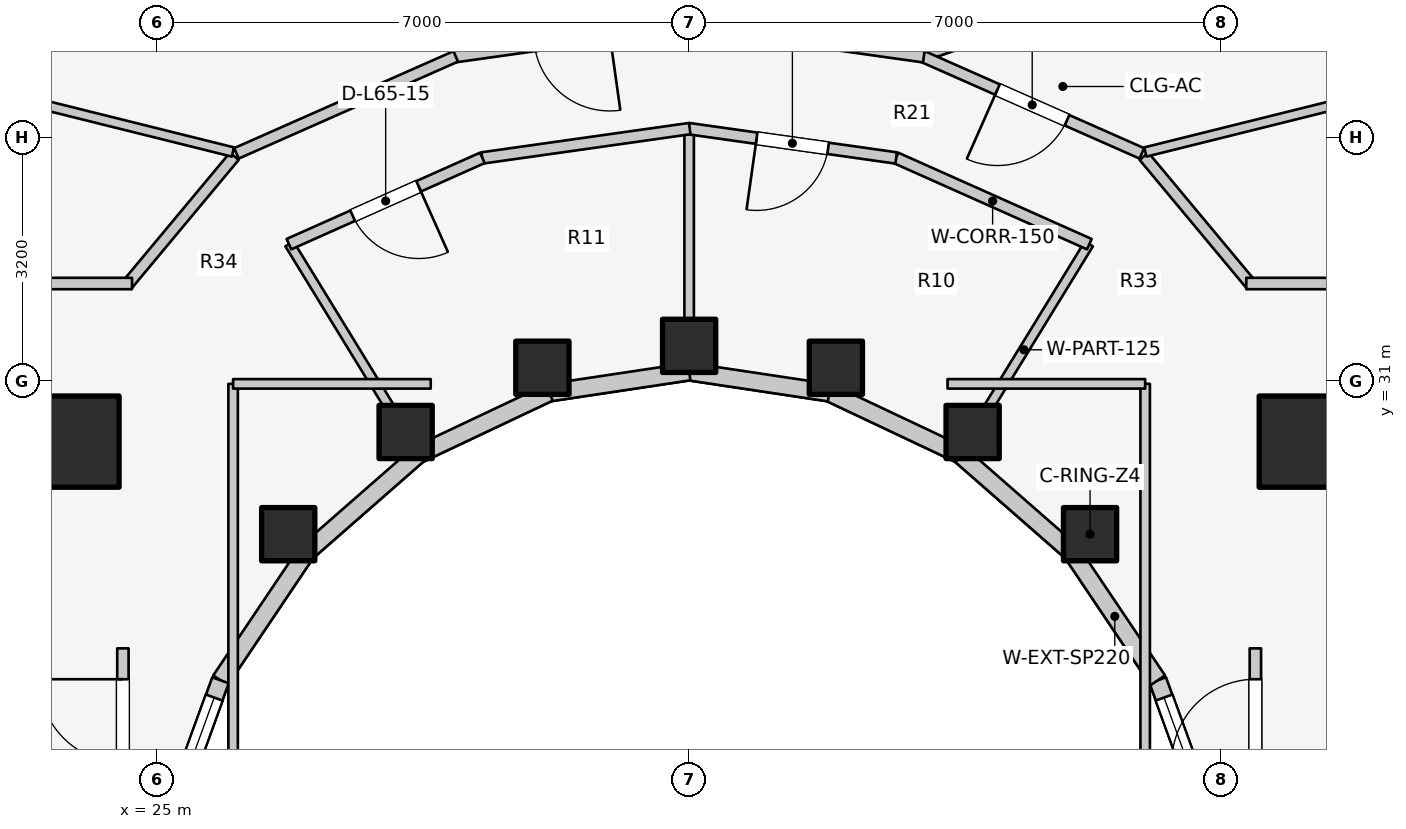
"""IFC4 building model, lengths in metres.
Left out: names, types, materials, properties, quantities, classifications, styles, units other than length and angle.
Written with IfcOpenShell. Run it as: python <this file> out.ifc"""

import sys

from ifc_helpers import new_model, si_unit, direction, frame, frame_2d, origin, origin_2d, place, context, subcontext, project, spatial, rectangle, extrude, element, fill, save


model = new_model("IFC4")
c1 = context("Model", 3, precision=1e-05, world=origin(), true_north=direction((0.0, 1.0)))
c2 = subcontext(c1, "Body", "Model", "MODEL_VIEW")
j1 = project(units=[si_unit("LENGTHUNIT", "METRE"), si_unit("PLANEANGLEUNIT", "RADIAN")], contexts=[c1])
p1 = place(None, origin())
s1 = spatial("IfcSite", under=j1, at=p1, CompositionType="ELEMENT")
p2 = place(p1, origin())
s2 = spatial("IfcBuilding", under=s1, at=p2, CompositionType="ELEMENT")
p3 = place(p2, frame((0.0, 0.0, 214.0)))
s3 = spatial("IfcBuildingStorey", under=s2, at=p3, CompositionType="ELEMENT", Elevation=214.0)
for number, where, z_axis, x_axis in (
    (1, (19.65, 30.35, 0.0), (0.0, 0.0, 1.0), (1.0, 0.0, 0.0)),
    (2, (39.85, 30.35, 0.0), (0.0, 0.0, 1.0), (1.0, 0.0, 0.0)),
):
    element("IfcWall", number, at=place(p3, frame(where, z_axis=z_axis, x_axis=x_axis)), inside=s3, PredefinedType="SHEAR", context=c2, shape_type="SweptSolid", body=[
        extrude(rectangle(XDim=4.5, YDim=0.55, at=frame_2d((2.25, 0.0))), origin(), (0.0, 0.0, 1.0), 3.1),
    ])
for number, where, z_axis, x_axis in (
    (3, (23.9, 30.2, 0.0), (0.0, 0.0, 1.0), (1.0, 0.0, 0.0)),
    (4, (40.1, 30.2, 0.0), (0.0, 0.0, 1.0), (1.0, 0.0, 0.0)),
):
    element("IfcColumn", number, at=place(p3, frame(where, z_axis=z_axis, x_axis=x_axis)), inside=s3, PredefinedType="COLUMN", context=c2, shape_type="SweptSolid", body=[
        extrude(rectangle(XDim=1.2, YDim=1.2, at=origin_2d()), origin(), (0.0, 0.0, 1.0), 3.1),
    ])
for number, where, z_axis, x_axis in (
    (5, (37.275, 28.982, 0.0), (0.0, 0.0, 1.0), (1.0, 0.0, 0.0)),
    (6, (35.73, 30.327, 0.0), (0.0, 0.0, 1.0), (1.0, 0.0, 0.0)),
    (7, (33.931, 31.172, 0.0), (0.0, 0.0, 1.0), (1.0, 0.0, 0.0)),
    (8, (32.0, 31.46, 0.0), (0.0, 0.0, 1.0), (1.0, 0.0, 0.0)),
    (9, (30.069, 31.172, 0.0), (0.0, 0.0, 1.0), (1.0, 0.0, 0.0)),
    (10, (28.27, 30.327, 0.0), (0.0, 0.0, 1.0), (1.0, 0.0, 0.0)),
    (11, (26.725, 28.982, 0.0), (0.0, 0.0, 1.0), (1.0, 0.0, 0.0)),
):
    element("IfcColumn", number, at=place(p3, frame(where, z_axis=z_axis, x_axis=x_axis)), inside=s3, PredefinedType="COLUMN", context=c2, shape_type="SweptSolid", body=[
        extrude(rectangle(XDim=0.7, YDim=0.7, at=origin_2d()), origin(), (0.0, 0.0, 1.0), 3.1),
    ])
p4 = place(p3, frame((38.877, 25.102, 0.0), z_axis=(0.0, 0.0, 1.0), x_axis=(-0.341423187295, 0.93990968033, 0.0)))
e12 = element("IfcWall", 12, at=p4, inside=s3, PredefinedType="STANDARD", context=c2, shape_type="SweptSolid", body=[
    extrude(rectangle(XDim=2.084, YDim=0.23, at=frame_2d((1.042, 0.0))), origin(), (0.0, 0.0, 1.0), 2.84),
])
p5 = place(p4, frame((0.242, 0.0, 0.85)))
e13 = element("IfcOpeningElement", 13, at=p5, cuts=e12, PredefinedType="OPENING", context=c2, shape_type="SweptSolid", body=[
    extrude(rectangle(XDim=1.6, YDim=1.65, at=frame_2d((0.8, 0.825))), frame((0.0, 0.125, 0.0), z_axis=(0.0, -1.0, 0.0), x_axis=(1.0, 0.0, 0.0)), (0.0, 0.0, 1.0), 0.25),
])
p6 = place(p3, frame((38.166, 27.06, 0.0), z_axis=(0.0, 0.0, 1.0), x_axis=(-0.558197800898, 0.829707909492, 0.0)))
e14 = element("IfcWall", 14, at=p6, inside=s3, PredefinedType="STANDARD", context=c2, shape_type="SweptSolid", body=[
    extrude(rectangle(XDim=2.027, YDim=0.23, at=frame_2d((1.013, 0.0))), origin(), (0.0, 0.0, 1.0), 2.16),
])
p7 = place(p3, frame((37.035, 28.742, 0.0), z_axis=(0.0, 0.0, 1.0), x_axis=(-0.752576694707, 0.658504607869, 0.0)))
e15 = element("IfcWall", 15, at=p7, inside=s3, PredefinedType="STANDARD", context=c2, shape_type="SweptSolid", body=[
    extrude(rectangle(XDim=1.959, YDim=0.23, at=frame_2d((0.98, 0.0))), origin(), (0.0, 0.0, 1.0), 2.16),
])
p8 = place(p3, frame((35.56, 30.032, 0.0), z_axis=(0.0, 0.0, 1.0), x_axis=(-0.904179699603, 0.427152280606, 0.0)))
e16 = element("IfcWall", 16, at=p8, inside=s3, PredefinedType="STANDARD", context=c2, shape_type="SweptSolid", body=[
    extrude(rectangle(XDim=1.899, YDim=0.23, at=frame_2d((0.95, 0.0))), origin(), (0.0, 0.0, 1.0), 2.16),
])
for number, where, z_axis, x_axis in (
    (17, (33.843, 30.843, 0.0), (0.0, 0.0, 1.0), (-0.989, 0.149, 0.0)),
    (18, (32.0, 31.12, 0.0), (0.0, 0.0, 1.0), (-0.989, -0.149, 0.0)),
):
    element("IfcWall", number, at=place(p3, frame(where, z_axis=z_axis, x_axis=x_axis)), inside=s3, PredefinedType="STANDARD", context=c2, shape_type="SweptSolid", body=[
        extrude(rectangle(XDim=1.864, YDim=0.23, at=frame_2d((0.932, 0.0))), origin(), (0.0, 0.0, 1.0), 2.16),
    ])
p9 = place(p3, frame((30.157, 30.843, 0.0), z_axis=(0.0, 0.0, 1.0), x_axis=(-0.904179699603, -0.427152280606, 0.0)))
e19 = element("IfcWall", 19, at=p9, inside=s3, PredefinedType="STANDARD", context=c2, shape_type="SweptSolid", body=[
    extrude(rectangle(XDim=1.899, YDim=0.23, at=frame_2d((0.95, 0.0))), origin(), (0.0, 0.0, 1.0), 2.16),
])
p10 = place(p3, frame((28.44, 30.032, 0.0), z_axis=(0.0, 0.0, 1.0), x_axis=(-0.752576694707, -0.658504607869, 0.0)))
e20 = element("IfcWall", 20, at=p10, inside=s3, PredefinedType="STANDARD", context=c2, shape_type="SweptSolid", body=[
    extrude(rectangle(XDim=1.959, YDim=0.23, at=frame_2d((0.98, 0.0))), origin(), (0.0, 0.0, 1.0), 2.16),
])
p11 = place(p3, frame((26.965, 28.742, 0.0), z_axis=(0.0, 0.0, 1.0), x_axis=(-0.558197800898, -0.829707909492, 0.0)))
e21 = element("IfcWall", 21, at=p11, inside=s3, PredefinedType="STANDARD", context=c2, shape_type="SweptSolid", body=[
    extrude(rectangle(XDim=2.027, YDim=0.23, at=frame_2d((1.013, 0.0))), origin(), (0.0, 0.0, 1.0), 2.16),
])
p12 = place(p3, frame((25.834, 27.06, 0.0), z_axis=(0.0, 0.0, 1.0), x_axis=(-0.341423187295, -0.93990968033, 0.0)))
e22 = element("IfcWall", 22, at=p12, inside=s3, PredefinedType="STANDARD", context=c2, shape_type="SweptSolid", body=[
    extrude(rectangle(XDim=2.084, YDim=0.23, at=frame_2d((1.042, 0.0))), origin(), (0.0, 0.0, 1.0), 2.84),
])
p13 = place(p12, frame((0.242, 0.0, 0.85)))
e23 = element("IfcOpeningElement", 23, at=p13, cuts=e22, PredefinedType="OPENING", context=c2, shape_type="SweptSolid", body=[
    extrude(rectangle(XDim=1.6, YDim=1.65, at=frame_2d((0.8, 0.825))), frame((0.0, 0.125, 0.0), z_axis=(0.0, -1.0, 0.0), x_axis=(1.0, 0.0, 0.0)), (0.0, 0.0, 1.0), 0.25),
])
p14 = place(p3, frame((24.55, 24.08, 0.0), z_axis=(0.0, 0.0, 1.0), x_axis=(0.0, 1.0, 0.0)))
e24 = element("IfcWall", 24, at=p14, inside=s3, PredefinedType="PARTITIONING", context=c2, shape_type="SweptSolid", body=[
    extrude(rectangle(XDim=3.4, YDim=0.15, at=frame_2d((1.7, 0.0))), origin(), (0.0, 0.0, 1.0), 2.855),
])
p15 = place(p14, frame((1.894, 0.0, 0.0)))
e25 = element("IfcOpeningElement", 25, at=p15, cuts=e24, PredefinedType="OPENING", context=c2, shape_type="SweptSolid", body=[
    extrude(rectangle(XDim=1.1, YDim=2.1, at=frame_2d((0.55, 1.05))), frame((0.0, 0.085, 0.0), z_axis=(0.0, -1.0, 0.0), x_axis=(1.0, 0.0, 0.0)), (0.0, 0.0, 1.0), 0.17),
])
p16 = place(p3, frame((39.45, 24.08, 0.0), z_axis=(0.0, 0.0, 1.0), x_axis=(0.0, 1.0, 0.0)))
e26 = element("IfcWall", 26, at=p16, inside=s3, PredefinedType="PARTITIONING", context=c2, shape_type="SweptSolid", body=[
    extrude(rectangle(XDim=3.4, YDim=0.15, at=frame_2d((1.7, 0.0))), origin(), (0.0, 0.0, 1.0), 2.855),
])
p17 = place(p16, frame((1.894, 0.0, 0.0)))
e27 = element("IfcOpeningElement", 27, at=p17, cuts=e26, PredefinedType="OPENING", context=c2, shape_type="SweptSolid", body=[
    extrude(rectangle(XDim=1.1, YDim=2.1, at=frame_2d((0.55, 1.05))), frame((0.0, 0.085, 0.0), z_axis=(0.0, -1.0, 0.0), x_axis=(1.0, 0.0, 0.0)), (0.0, 0.0, 1.0), 0.17),
])
p18 = place(p3, frame((35.55, 30.015, 0.0), z_axis=(0.0, 0.0, 1.0), x_axis=(0.522763432117, 0.852477796802, 0.0)))
e28 = element("IfcWall", 28, at=p18, inside=s3, PredefinedType="PARTITIONING", context=c2, shape_type="SweptSolid", body=[
    extrude(rectangle(XDim=3.269, YDim=0.125, at=frame_2d((1.635, 0.0))), origin(), (0.0, 0.0, 1.0), 2.376),
])
p19 = place(p3, frame((32.0, 31.1, 0.0), z_axis=(0.0, 0.0, 1.0), x_axis=(0.0, 1.0, 0.0)))
e29 = element("IfcWall", 29, at=p19, inside=s3, PredefinedType="PARTITIONING", context=c2, shape_type="SweptSolid", body=[
    extrude(rectangle(XDim=3.218, YDim=0.125, at=frame_2d((1.609, 0.0))), origin(), (0.0, 0.0, 1.0), 2.376),
])
p20 = place(p3, frame((28.45, 30.015, 0.0), z_axis=(0.0, 0.0, 1.0), x_axis=(-0.522763432117, 0.852477796802, 0.0)))
e30 = element("IfcWall", 30, at=p20, inside=s3, PredefinedType="PARTITIONING", context=c2, shape_type="SweptSolid", body=[
    extrude(rectangle(XDim=3.269, YDim=0.125, at=frame_2d((1.635, 0.0))), origin(), (0.0, 0.0, 1.0), 2.376),
])
p21 = place(p3, frame((37.265, 32.798, 0.0), z_axis=(0.0, 0.0, 1.0), x_axis=(-0.913254317828, 0.407389924971, 0.0)))
e31 = element("IfcWall", 31, at=p21, inside=s3, PredefinedType="PARTITIONING", context=c2, shape_type="SweptSolid", body=[
    extrude(rectangle(XDim=2.787, YDim=0.15, at=frame_2d((1.393, 0.0))), origin(), (0.0, 0.0, 1.0), 2.376),
])
p22 = place(p3, frame((34.724, 33.932, 0.0), z_axis=(0.0, 0.0, 1.0), x_axis=(-0.990150268487, 0.140008734782, 0.0)))
e32 = element("IfcWall", 32, at=p22, inside=s3, PredefinedType="PARTITIONING", context=c2, shape_type="SweptSolid", body=[
    extrude(rectangle(XDim=2.759, YDim=0.15, at=frame_2d((1.379, 0.0))), origin(), (0.0, 0.0, 1.0), 2.376),
])
p23 = place(p22, frame((0.904, 0.0, 0.0)))
e33 = element("IfcOpeningElement", 33, at=p23, cuts=e32, PredefinedType="OPENING", context=c2, shape_type="SweptSolid", body=[
    extrude(rectangle(XDim=0.95, YDim=2.1, at=frame_2d((0.475, 1.05))), frame((0.0, 0.085, 0.0), z_axis=(0.0, -1.0, 0.0), x_axis=(1.0, 0.0, 0.0)), (0.0, 0.0, 1.0), 0.17),
])
p24 = place(p3, frame((32.007, 34.318, 0.0), z_axis=(0.0, 0.0, 1.0), x_axis=(-0.990150268487, -0.140008734782, 0.0)))
e34 = element("IfcWall", 34, at=p24, inside=s3, PredefinedType="PARTITIONING", context=c2, shape_type="SweptSolid", body=[
    extrude(rectangle(XDim=2.759, YDim=0.15, at=frame_2d((1.379, 0.0))), origin(), (0.0, 0.0, 1.0), 2.376),
])
p25 = place(p3, frame((29.28, 33.933, 0.0), z_axis=(0.0, 0.0, 1.0), x_axis=(-0.913254317828, -0.407389924971, 0.0)))
e35 = element("IfcWall", 35, at=p25, inside=s3, PredefinedType="PARTITIONING", context=c2, shape_type="SweptSolid", body=[
    extrude(rectangle(XDim=2.787, YDim=0.15, at=frame_2d((1.393, 0.0))), origin(), (0.0, 0.0, 1.0), 2.376),
])
p26 = place(p25, frame((0.918, 0.0, 0.0)))
e36 = element("IfcOpeningElement", 36, at=p26, cuts=e35, PredefinedType="OPENING", context=c2, shape_type="SweptSolid", body=[
    extrude(rectangle(XDim=0.95, YDim=2.1, at=frame_2d((0.475, 1.05))), frame((0.0, 0.085, 0.0), z_axis=(0.0, -1.0, 0.0), x_axis=(1.0, 0.0, 0.0)), (0.0, 0.0, 1.0), 0.17),
])
p27 = place(p3, frame((26.0, 25.8, 0.0), z_axis=(0.0, 0.0, 1.0), x_axis=(0.0, 1.0, 0.0)))
e37 = element("IfcWall", 37, at=p27, inside=s3, PredefinedType="PARTITIONING", context=c2, shape_type="SweptSolid", body=[
    extrude(rectangle(XDim=5.16, YDim=0.125, at=frame_2d((2.58, 0.0))), origin(), (0.0, 0.0, 1.0), 2.232),
])
p28 = place(p3, frame((26.0, 30.96, 0.0), z_axis=(0.0, 0.0, 1.0), x_axis=(1.0, 0.0, 0.0)))
e38 = element("IfcWall", 38, at=p28, inside=s3, PredefinedType="PARTITIONING", context=c2, shape_type="SweptSolid", body=[
    extrude(rectangle(XDim=2.6, YDim=0.125, at=frame_2d((1.3, 0.0))), origin(), (0.0, 0.0, 1.0), 2.376),
])
p29 = place(p3, frame((38.0, 25.8, 0.0), z_axis=(0.0, 0.0, 1.0), x_axis=(0.0, 1.0, 0.0)))
e39 = element("IfcWall", 39, at=p29, inside=s3, PredefinedType="PARTITIONING", context=c2, shape_type="SweptSolid", body=[
    extrude(rectangle(XDim=5.16, YDim=0.125, at=frame_2d((2.58, 0.0))), origin(), (0.0, 0.0, 1.0), 2.232),
])
p30 = place(p3, frame((35.4, 30.96, 0.0), z_axis=(0.0, 0.0, 1.0), x_axis=(1.0, 0.0, 0.0)))
e40 = element("IfcWall", 40, at=p30, inside=s3, PredefinedType="PARTITIONING", context=c2, shape_type="SweptSolid", body=[
    extrude(rectangle(XDim=2.6, YDim=0.125, at=frame_2d((1.3, 0.0))), origin(), (0.0, 0.0, 1.0), 2.376),
])
p31 = place(p3, frame((37.984, 33.955, 0.0), z_axis=(0.0, 0.0, 1.0), x_axis=(0.64030392053, -0.76812166312, 0.0)))
e41 = element("IfcWall", 41, at=p31, inside=s3, PredefinedType="PARTITIONING", context=c2, shape_type="SweptSolid", body=[
    extrude(rectangle(XDim=2.21, YDim=0.15, at=frame_2d((1.105, 0.0))), origin(), (0.0, 0.0, 1.0), 2.376),
])
p32 = place(p3, frame((39.33, 32.28, 0.0), z_axis=(0.0, 0.0, 1.0), x_axis=(1.0, 0.0, 0.0)))
e42 = element("IfcWall", 42, at=p32, inside=s3, PredefinedType="PARTITIONING", context=c2, shape_type="SweptSolid", body=[
    extrude(rectangle(XDim=7.52, YDim=0.15, at=frame_2d((3.76, 0.0))), origin(), (0.0, 0.0, 1.0), 2.376),
])
p33 = place(p32, frame((5.22, 0.0, 0.0)))
e43 = element("IfcOpeningElement", 43, at=p33, cuts=e42, PredefinedType="OPENING", context=c2, shape_type="SweptSolid", body=[
    extrude(rectangle(XDim=0.9, YDim=2.1, at=frame_2d((0.45, 1.05))), frame((0.0, 0.085, 0.0), z_axis=(0.0, -1.0, 0.0), x_axis=(1.0, 0.0, 0.0)), (0.0, 0.0, 1.0), 0.17),
])
p34 = place(p3, frame((26.016, 33.955, 0.0), z_axis=(0.0, 0.0, 1.0), x_axis=(-0.64030392053, -0.76812166312, 0.0)))
e44 = element("IfcWall", 44, at=p34, inside=s3, PredefinedType="PARTITIONING", context=c2, shape_type="SweptSolid", body=[
    extrude(rectangle(XDim=2.21, YDim=0.15, at=frame_2d((1.105, 0.0))), origin(), (0.0, 0.0, 1.0), 2.376),
])
p35 = place(p3, frame((17.15, 32.28, 0.0), z_axis=(0.0, 0.0, 1.0), x_axis=(1.0, 0.0, 0.0)))
e45 = element("IfcWall", 45, at=p35, inside=s3, PredefinedType="PARTITIONING", context=c2, shape_type="SweptSolid", body=[
    extrude(rectangle(XDim=7.52, YDim=0.15, at=frame_2d((3.76, 0.0))), origin(), (0.0, 0.0, 1.0), 2.376),
])
p36 = place(p35, frame((1.3, 0.0, 0.0)))
e46 = element("IfcOpeningElement", 46, at=p36, cuts=e45, PredefinedType="OPENING", context=c2, shape_type="SweptSolid", body=[
    extrude(rectangle(XDim=0.9, YDim=2.1, at=frame_2d((0.45, 1.05))), frame((0.0, 0.085, 0.0), z_axis=(0.0, -1.0, 0.0), x_axis=(1.0, 0.0, 0.0)), (0.0, 0.0, 1.0), 0.17),
])
p37 = place(p3, frame((38.002, 34.01, 0.0), z_axis=(0.0, 0.0, 1.0), x_axis=(0.970445810114, 0.241319144769, 0.0)))
e47 = element("IfcWall", 47, at=p37, inside=s3, PredefinedType="PARTITIONING", context=c2, shape_type="SweptSolid", body=[
    extrude(rectangle(XDim=5.526, YDim=0.125, at=frame_2d((2.763, 0.0))), origin(), (0.0, 0.0, 1.0), 2.376),
])
p38 = place(p3, frame((35.131, 35.283, 0.0), z_axis=(0.0, 0.0, 1.0), x_axis=(0.944311395416, 0.329053169697, 0.0)))
e48 = element("IfcWall", 48, at=p38, inside=s3, PredefinedType="PARTITIONING", context=c2, shape_type="SweptSolid", body=[
    extrude(rectangle(XDim=3.84, YDim=0.125, at=frame_2d((1.92, 0.0))), origin(), (0.0, 0.0, 1.0), 2.376),
])
p39 = place(p3, frame((25.998, 34.01, 0.0), z_axis=(0.0, 0.0, 1.0), x_axis=(-0.970445810114, 0.241319144769, 0.0)))
e49 = element("IfcWall", 49, at=p39, inside=s3, PredefinedType="PARTITIONING", context=c2, shape_type="SweptSolid", body=[
    extrude(rectangle(XDim=5.526, YDim=0.125, at=frame_2d((2.763, 0.0))), origin(), (0.0, 0.0, 1.0), 2.376),
])
p40 = place(p3, frame((37.956, 33.992, 0.0), z_axis=(0.0, 0.0, 1.0), x_axis=(-0.914642679993, 0.404263240891, 0.0)))
e50 = element("IfcWall", 50, at=p40, inside=s3, PredefinedType="PARTITIONING", context=c2, shape_type="SweptSolid", body=[
    extrude(rectangle(XDim=3.154, YDim=0.15, at=frame_2d((1.577, 0.0))), origin(), (0.0, 0.0, 1.0), 2.376),
])
p41 = place(p40, frame((1.077, 0.0, 0.0)))
e51 = element("IfcOpeningElement", 51, at=p41, cuts=e50, PredefinedType="OPENING", context=c2, shape_type="SweptSolid", body=[
    extrude(rectangle(XDim=1.0, YDim=2.1, at=frame_2d((0.5, 1.05))), frame((0.0, 0.085, 0.0), z_axis=(0.0, -1.0, 0.0), x_axis=(1.0, 0.0, 0.0)), (0.0, 0.0, 1.0), 0.17),
])
p42 = place(p3, frame((35.087, 35.263, 0.0), z_axis=(0.0, 0.0, 1.0), x_axis=(-0.990268690673, 0.139168675614, 0.0)))
e52 = element("IfcWall", 52, at=p42, inside=s3, PredefinedType="PARTITIONING", context=c2, shape_type="SweptSolid", body=[
    extrude(rectangle(XDim=3.126, YDim=0.15, at=frame_2d((1.563, 0.0))), origin(), (0.0, 0.0, 1.0), 2.376),
])
p43 = place(p3, frame((32.008, 35.698, 0.0), z_axis=(0.0, 0.0, 1.0), x_axis=(-0.990268690673, -0.139168675614, 0.0)))
e53 = element("IfcWall", 53, at=p43, inside=s3, PredefinedType="PARTITIONING", context=c2, shape_type="SweptSolid", body=[
    extrude(rectangle(XDim=3.126, YDim=0.15, at=frame_2d((1.563, 0.0))), origin(), (0.0, 0.0, 1.0), 2.376),
])
p44 = place(p43, frame((1.063, 0.0, 0.0)))
e54 = element("IfcOpeningElement", 54, at=p44, cuts=e53, PredefinedType="OPENING", context=c2, shape_type="SweptSolid", body=[
    extrude(rectangle(XDim=1.0, YDim=2.1, at=frame_2d((0.5, 1.05))), frame((0.0, 0.085, 0.0), z_axis=(0.0, -1.0, 0.0), x_axis=(1.0, 0.0, 0.0)), (0.0, 0.0, 1.0), 0.17),
])
p45 = place(p3, frame((28.929, 35.268, 0.0), z_axis=(0.0, 0.0, 1.0), x_axis=(-0.914642679993, -0.404263240891, 0.0)))
e55 = element("IfcWall", 55, at=p45, inside=s3, PredefinedType="PARTITIONING", context=c2, shape_type="SweptSolid", body=[
    extrude(rectangle(XDim=3.154, YDim=0.15, at=frame_2d((1.577, 0.0))), origin(), (0.0, 0.0, 1.0), 2.376),
])
p46 = place(p5, origin())
e56 = element("IfcWindow", 56, at=p46, inside=s3, PartitioningType="SINGLE_PANEL", PredefinedType="WINDOW", context=c2, shape_type="SweptSolid", body=[
    extrude(rectangle(XDim=1.6, YDim=1.65, at=frame_2d((0.8, 0.825))), frame((0.0, 0.03, 0.0), z_axis=(0.0, -1.0, 0.0), x_axis=(1.0, 0.0, 0.0)), (0.0, 0.0, 1.0), 0.06),
])
fill(e13, e56)
p47 = place(p13, origin())
e57 = element("IfcWindow", 57, at=p47, inside=s3, PartitioningType="SINGLE_PANEL", PredefinedType="WINDOW", context=c2, shape_type="SweptSolid", body=[
    extrude(rectangle(XDim=1.6, YDim=1.65, at=frame_2d((0.8, 0.825))), frame((0.0, 0.03, 0.0), z_axis=(0.0, -1.0, 0.0), x_axis=(1.0, 0.0, 0.0)), (0.0, 0.0, 1.0), 0.06),
])
fill(e23, e57)
p48 = place(p15, origin())
e58 = element("IfcDoor", 58, at=p48, inside=s3, OperationType="SINGLE_SWING_RIGHT", PredefinedType="DOOR", context=c2, shape_type="SweptSolid", body=[
    extrude(rectangle(XDim=1.1, YDim=2.1, at=frame_2d((0.55, 1.05))), frame((0.0, 0.025, 0.0), z_axis=(0.0, -1.0, 0.0), x_axis=(1.0, 0.0, 0.0)), (0.0, 0.0, 1.0), 0.05),
])
fill(e25, e58)
p49 = place(p17, origin())
e59 = element("IfcDoor", 59, at=p49, inside=s3, OperationType="SINGLE_SWING_LEFT", PredefinedType="DOOR", context=c2, shape_type="SweptSolid", body=[
    extrude(rectangle(XDim=1.1, YDim=2.1, at=frame_2d((0.55, 1.05))), frame((0.0, 0.025, 0.0), z_axis=(0.0, -1.0, 0.0), x_axis=(1.0, 0.0, 0.0)), (0.0, 0.0, 1.0), 0.05),
])
fill(e27, e59)
p50 = place(p23, origin())
e60 = element("IfcDoor", 60, at=p50, inside=s3, OperationType="SINGLE_SWING_RIGHT", PredefinedType="DOOR", context=c2, shape_type="SweptSolid", body=[
    extrude(rectangle(XDim=0.95, YDim=2.1, at=frame_2d((0.475, 1.05))), frame((0.0, 0.025, 0.0), z_axis=(0.0, -1.0, 0.0), x_axis=(1.0, 0.0, 0.0)), (0.0, 0.0, 1.0), 0.05),
])
fill(e33, e60)
p51 = place(p26, origin())
e61 = element("IfcDoor", 61, at=p51, inside=s3, OperationType="SINGLE_SWING_LEFT", PredefinedType="DOOR", context=c2, shape_type="SweptSolid", body=[
    extrude(rectangle(XDim=0.95, YDim=2.1, at=frame_2d((0.475, 1.05))), frame((0.0, 0.025, 0.0), z_axis=(0.0, -1.0, 0.0), x_axis=(1.0, 0.0, 0.0)), (0.0, 0.0, 1.0), 0.05),
])
fill(e36, e61)
p52 = place(p41, origin())
e62 = element("IfcDoor", 62, at=p52, inside=s3, OperationType="SINGLE_SWING_RIGHT", PredefinedType="DOOR", context=c2, shape_type="SweptSolid", body=[
    extrude(rectangle(XDim=1.0, YDim=2.1, at=frame_2d((0.5, 1.05))), frame((0.0, 0.025, 0.0), z_axis=(0.0, -1.0, 0.0), x_axis=(1.0, 0.0, 0.0)), (0.0, 0.0, 1.0), 0.05),
])
fill(e51, e62)
save(model, sys.argv[1])
